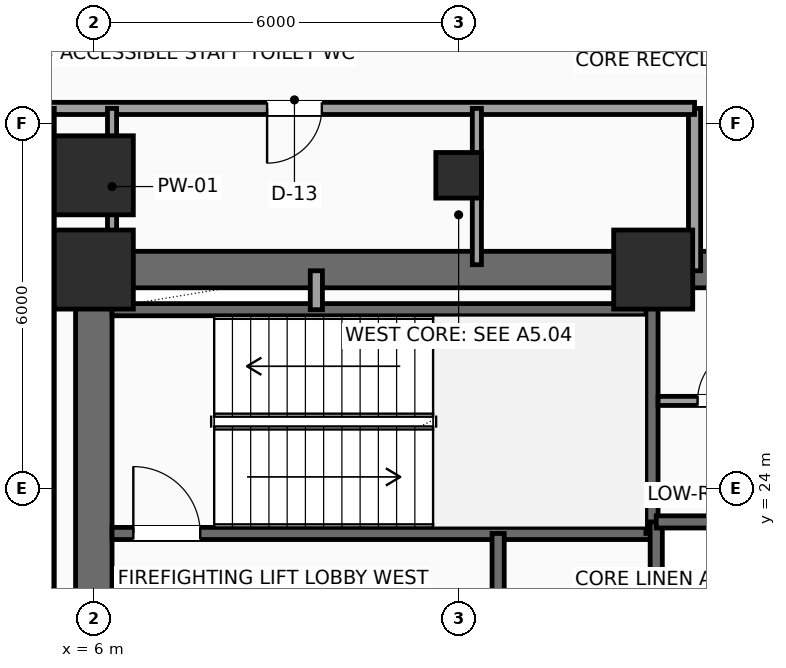
"""IFC4 building model, lengths in metres.
Left out: names, types, materials, properties, quantities, classifications, styles, units other than length and angle.
Written with IfcOpenShell. Run it as: python <this file> out.ifc"""

import sys

from ifc_helpers import new_model, si_unit, direction, frame, frame_2d, origin, origin_2d, place, context, subcontext, project, spatial, rectangle, hollow_rectangle, extrude, element, fill, save


model = new_model("IFC4")
c1 = context("Model", 3, precision=1e-05, world=origin(), true_north=direction((0.0, 1.0)))
c2 = subcontext(c1, "Body", "Model", "MODEL_VIEW")
j1 = project(units=[si_unit("LENGTHUNIT", "METRE"), si_unit("PLANEANGLEUNIT", "RADIAN")], contexts=[c1])
p1 = place(None, origin())
s1 = spatial("IfcSite", under=j1, at=p1, CompositionType="ELEMENT")
p2 = place(p1, origin())
s2 = spatial("IfcBuilding", under=s1, at=p2, CompositionType="ELEMENT")
p3 = place(p2, frame((0.0, 0.0, 63.6)))
s3 = spatial("IfcBuildingStorey", under=s2, at=p3, CompositionType="ELEMENT", Elevation=63.6)
for number, where, z_axis, x_axis in (
    (1, (6.0, 27.6, 0.0), (0.0, 0.0, 1.0), (1.0, 0.0, 0.0)),
    (2, (15.2, 27.6, 0.0), (0.0, 0.0, 1.0), (1.0, 0.0, 0.0)),
    (3, (6.0, 29.15, 0.0), (0.0, 0.0, 1.0), (1.0, 0.0, 0.0)),
):
    element("IfcColumn", number, at=place(p3, frame(where, z_axis=z_axis, x_axis=x_axis)), inside=s3, PredefinedType="COLUMN", context=c2, shape_type="SweptSolid", body=[
        extrude(rectangle(XDim=1.3, YDim=1.3, at=origin_2d()), origin(), (0.0, 0.0, 1.0), 3.9),
    ])
p4 = place(p3, frame((12.0, 29.15, 0.0), z_axis=(0.0, 0.0, 1.0), x_axis=(1.0, 0.0, 0.0)))
e4 = element("IfcColumn", 4, at=p4, inside=s3, PredefinedType="COLUMN", context=c2, shape_type="SweptSolid", body=[
    extrude(hollow_rectangle(XDim=0.75, YDim=0.75, WallThickness=0.035, InnerFilletRadius=0.035, OuterFilletRadius=0.05, at=origin_2d()), origin(), (0.0, 0.0, 1.0), 3.9),
])
p5 = place(p3, frame((6.0, 27.6, 0.0), z_axis=(0.0, 0.0, 1.0), x_axis=(1.0, 0.0, 0.0)))
e5 = element("IfcWall", 5, at=p5, inside=s3, PredefinedType="SHEAR", context=c2, shape_type="SweptSolid", body=[
    extrude(rectangle(XDim=12.0, YDim=0.6, at=frame_2d((6.0, 0.0))), origin(), (0.0, 0.0, 1.0), 3.65),
])
p6 = place(p5, frame((10.2, 0.0, 0.0)))
e6 = element("IfcOpeningElement", 6, at=p6, cuts=e5, PredefinedType="OPENING", context=c2, shape_type="SweptSolid", body=[
    extrude(rectangle(XDim=0.9, YDim=2.15, at=frame_2d((0.45, 1.075))), frame((0.0, 0.31, 0.0), z_axis=(0.0, -1.0, 0.0), x_axis=(1.0, 0.0, 0.0)), (0.0, 0.0, 1.0), 0.62),
])
p7 = place(p3, frame((6.0, 18.0, 0.0), z_axis=(0.0, 0.0, 1.0), x_axis=(0.0, 1.0, 0.0)))
e7 = element("IfcWall", 7, at=p7, inside=s3, PredefinedType="SHEAR", context=c2, shape_type="SweptSolid", body=[
    extrude(rectangle(XDim=9.6, YDim=0.6, at=frame_2d((4.8, 0.0))), origin(), (0.0, 0.0, 1.0), 3.65),
])
p8 = place(p3, frame((6.3, 23.26, 0.0), z_axis=(0.0, 0.0, 1.0), x_axis=(1.0, 0.0, 0.0)))
e8 = element("IfcWall", 8, at=p8, inside=s3, PredefinedType="SHEAR", context=c2, shape_type="SweptSolid", body=[
    extrude(rectangle(XDim=8.88, YDim=0.2, at=frame_2d((4.44, 0.0))), origin(), (0.0, 0.0, 1.0), 3.65),
])
p9 = place(p8, frame((0.35, 0.0, 0.0)))
e9 = element("IfcOpeningElement", 9, at=p9, cuts=e8, PredefinedType="OPENING", context=c2, shape_type="SweptSolid", body=[
    extrude(rectangle(XDim=1.1, YDim=2.2, at=frame_2d((0.55, 1.1))), frame((0.0, 0.11, 0.0), z_axis=(0.0, -1.0, 0.0), x_axis=(1.0, 0.0, 0.0)), (0.0, 0.0, 1.0), 0.22),
])
p10 = place(p3, frame((6.3, 26.94, 0.0), z_axis=(0.0, 0.0, 1.0), x_axis=(1.0, 0.0, 0.0)))
e10 = element("IfcWall", 10, at=p10, inside=s3, PredefinedType="SHEAR", context=c2, shape_type="SweptSolid", body=[
    extrude(rectangle(XDim=8.88, YDim=0.2, at=frame_2d((4.44, 0.0))), origin(), (0.0, 0.0, 1.0), 3.65),
])
p11 = place(p3, frame((15.18, 23.26, 0.0), z_axis=(0.0, 0.0, 1.0), x_axis=(0.0, 1.0, 0.0)))
e11 = element("IfcWall", 11, at=p11, inside=s3, PredefinedType="SHEAR", context=c2, shape_type="SweptSolid", body=[
    extrude(rectangle(XDim=4.04, YDim=0.2, at=frame_2d((2.02, 0.0))), origin(), (0.0, 0.0, 1.0), 3.65),
])
p12 = place(p3, frame((12.65, 20.42, 0.0), z_axis=(0.0, 0.0, 1.0), x_axis=(0.0, 1.0, 0.0)))
e12 = element("IfcWall", 12, at=p12, inside=s3, PredefinedType="SHEAR", context=c2, shape_type="SweptSolid", body=[
    extrude(rectangle(XDim=2.84, YDim=0.2, at=frame_2d((1.42, 0.0))), origin(), (0.0, 0.0, 1.0), 3.65),
])
p13 = place(p12, frame((0.9, 0.0, 0.0)))
e13 = element("IfcOpeningElement", 13, at=p13, cuts=e12, PredefinedType="OPENING", context=c2, shape_type="SweptSolid", body=[
    extrude(rectangle(XDim=0.9, YDim=2.15, at=frame_2d((0.45, 1.075))), frame((0.0, 0.11, 0.0), z_axis=(0.0, -1.0, 0.0), x_axis=(1.0, 0.0, 0.0)), (0.0, 0.0, 1.0), 0.22),
])
p14 = place(p3, frame((9.66, 26.94, 0.0), z_axis=(0.0, 0.0, 1.0), x_axis=(0.0, 1.0, 0.0)))
e14 = element("IfcWall", 14, at=p14, inside=s3, PredefinedType="SOLIDWALL", context=c2, shape_type="SweptSolid", body=[
    extrude(rectangle(XDim=0.64, YDim=0.2, at=frame_2d((0.32, 0.0))), origin(), (0.0, 0.0, 1.0), 3.65),
])
p15 = place(p3, frame((15.25, 18.25, 0.0), z_axis=(0.0, 0.0, 1.0), x_axis=(0.0, 1.0, 0.0)))
e15 = element("IfcWall", 15, at=p15, inside=s3, PredefinedType="SHEAR", context=c2, shape_type="SweptSolid", body=[
    extrude(rectangle(XDim=5.2, YDim=0.2, at=frame_2d((2.6, 0.0))), origin(), (0.0, 0.0, 1.0), 3.65),
])
p16 = place(p3, frame((15.25, 23.45, 0.0), z_axis=(0.0, 0.0, 1.0), x_axis=(1.0, 0.0, 0.0)))
e16 = element("IfcWall", 16, at=p16, inside=s3, PredefinedType="SHEAR", context=c2, shape_type="SweptSolid", body=[
    extrude(rectangle(XDim=2.45, YDim=0.2, at=frame_2d((1.225, 0.0))), origin(), (0.0, 0.0, 1.0), 3.65),
])
p17 = place(p3, frame((15.28, 25.44, 0.0), z_axis=(0.0, 0.0, 1.0), x_axis=(1.0, 0.0, 0.0)))
e17 = element("IfcWall", 17, at=p17, inside=s3, PredefinedType="PARTITIONING", context=c2, shape_type="SweptSolid", body=[
    extrude(rectangle(XDim=2.42, YDim=0.15, at=frame_2d((1.21, 0.0))), origin(), (0.0, 0.0, 1.0), 3.65),
])
p18 = place(p17, frame((0.65, 0.0, 0.0)))
e18 = element("IfcOpeningElement", 18, at=p18, cuts=e17, PredefinedType="OPENING", context=c2, shape_type="SweptSolid", body=[
    extrude(rectangle(XDim=0.9, YDim=2.15, at=frame_2d((0.45, 1.075))), frame((0.0, 0.085, 0.0), z_axis=(0.0, -1.0, 0.0), x_axis=(1.0, 0.0, 0.0)), (0.0, 0.0, 1.0), 0.17),
])
p19 = place(p3, frame((15.88, 27.58, 0.0), z_axis=(0.0, 0.0, 1.0), x_axis=(0.0, 1.0, 0.0)))
e19 = element("IfcWall", 19, at=p19, inside=s3, PredefinedType="SOLIDWALL", context=c2, shape_type="SweptSolid", body=[
    extrude(rectangle(XDim=2.67, YDim=0.2, at=frame_2d((1.335, 0.0))), origin(), (0.0, 0.0, 1.0), 3.65),
])
p20 = place(p3, frame((15.88, 30.25, 0.0), z_axis=(0.0, 0.0, 1.0), x_axis=(-1.0, 0.0, 0.0)))
e20 = element("IfcWall", 20, at=p20, inside=s3, PredefinedType="SOLIDWALL", context=c2, shape_type="SweptSolid", body=[
    extrude(rectangle(XDim=10.63, YDim=0.2, at=frame_2d((5.315, 0.0))), origin(), (0.0, 0.0, 1.0), 3.65),
])
p21 = place(p20, frame((6.13, 0.0, 0.0)))
e21 = element("IfcOpeningElement", 21, at=p21, cuts=e20, PredefinedType="OPENING", context=c2, shape_type="SweptSolid", body=[
    extrude(rectangle(XDim=0.9, YDim=2.1, at=frame_2d((0.45, 1.05))), frame((0.0, 0.11, 0.0), z_axis=(0.0, -1.0, 0.0), x_axis=(1.0, 0.0, 0.0)), (0.0, 0.0, 1.0), 0.22),
])
p22 = place(p3, frame((5.25, 30.25, 0.0), z_axis=(0.0, 0.0, 1.0), x_axis=(0.0, -1.0, 0.0)))
e22 = element("IfcWall", 22, at=p22, inside=s3, PredefinedType="SOLIDWALL", context=c2, shape_type="SweptSolid", body=[
    extrude(rectangle(XDim=14.1, YDim=0.2, at=frame_2d((7.05, 0.0))), origin(), (0.0, 0.0, 1.0), 3.65),
])
for number, where, z_axis, x_axis in (
    (23, (6.3, 27.68, 0.0), (0.0, 0.0, 1.0), (0.0, 1.0, 0.0)),
    (24, (12.3, 27.68, 0.0), (0.0, 0.0, 1.0), (0.0, 1.0, 0.0)),
):
    element("IfcWall", number, at=place(p3, frame(where, z_axis=z_axis, x_axis=x_axis)), inside=s3, PredefinedType="PARTITIONING", context=c2, shape_type="SweptSolid", body=[
        extrude(rectangle(XDim=2.57, YDim=0.15, at=frame_2d((1.285, 0.0))), origin(), (0.0, 0.0, 1.0), 2.992),
    ])
p23 = place(p9, origin())
e25 = element("IfcDoor", 25, at=p23, inside=s3, OperationType="SINGLE_SWING_LEFT", PredefinedType="DOOR", context=c2, shape_type="SweptSolid", body=[
    extrude(rectangle(XDim=1.1, YDim=2.2, at=frame_2d((0.55, 1.1))), frame((0.0, 0.025, 0.0), z_axis=(0.0, -1.0, 0.0), x_axis=(1.0, 0.0, 0.0)), (0.0, 0.0, 1.0), 0.05),
])
fill(e9, e25)
p24 = place(p18, origin())
e26 = element("IfcDoor", 26, at=p24, inside=s3, OperationType="SINGLE_SWING_RIGHT", PredefinedType="DOOR", context=c2, shape_type="SweptSolid", body=[
    extrude(rectangle(XDim=0.9, YDim=2.15, at=frame_2d((0.45, 1.075))), frame((0.0, 0.025, 0.0), z_axis=(0.0, -1.0, 0.0), x_axis=(1.0, 0.0, 0.0)), (0.0, 0.0, 1.0), 0.05),
])
fill(e18, e26)
p25 = place(p21, origin())
e27 = element("IfcDoor", 27, at=p25, inside=s3, OperationType="SINGLE_SWING_RIGHT", PredefinedType="DOOR", context=c2, shape_type="SweptSolid", body=[
    extrude(rectangle(XDim=0.9, YDim=2.1, at=frame_2d((0.45, 1.05))), frame((0.0, 0.025, 0.0), z_axis=(0.0, -1.0, 0.0), x_axis=(1.0, 0.0, 0.0)), (0.0, 0.0, 1.0), 0.05),
])
fill(e21, e27)
save(model, sys.argv[1])
